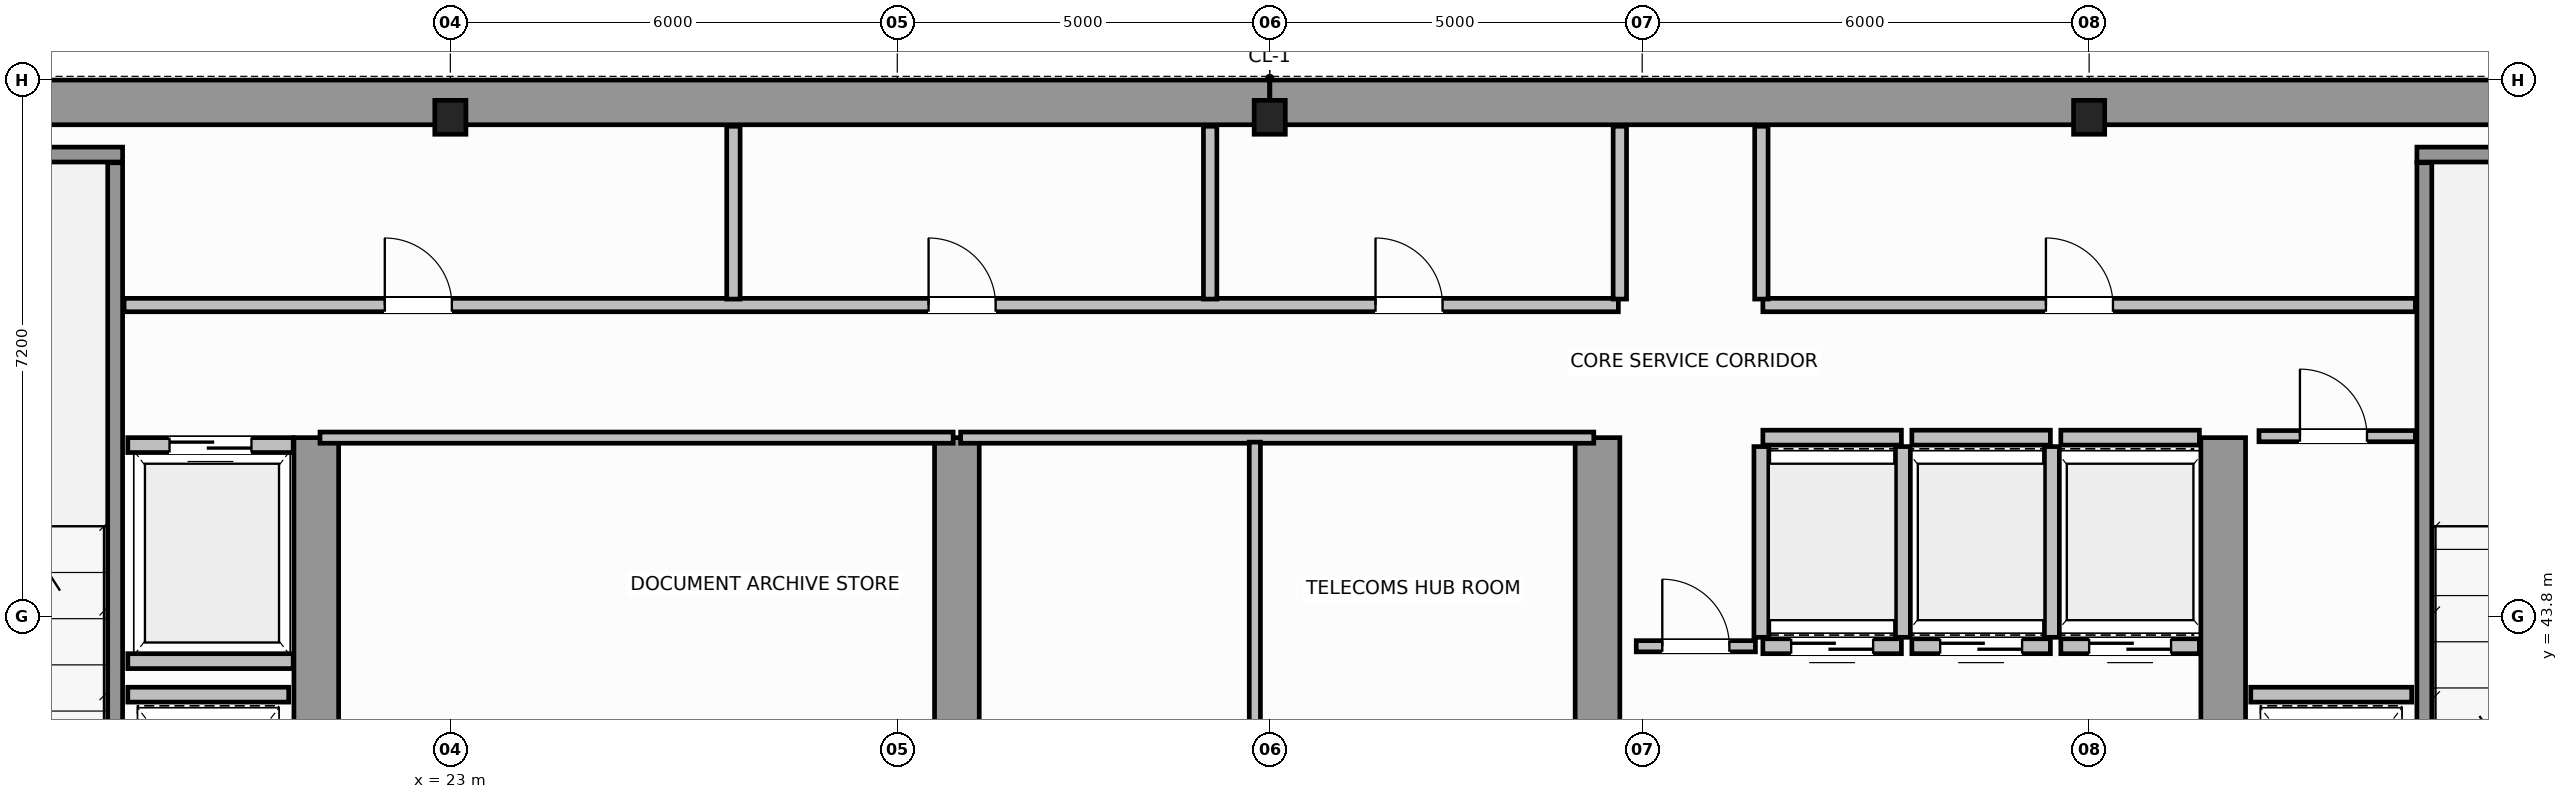
"""IFC4 building model, lengths in metres.
Left out: names, types, materials, properties, quantities, classifications, styles, units other than length and angle.
Written with IfcOpenShell. Run it as: python <this file> out.ifc"""

import sys

from ifc_helpers import new_model, si_unit, direction, frame, frame_2d, origin, origin_2d, place, context, subcontext, project, spatial, rectangle, i_section, extrude, source, transform, mapped, element, fill, save


model = new_model("IFC4")
c1 = context("Model", 3, precision=1e-05, world=origin(), true_north=direction((0.0, 1.0)))
c2 = subcontext(c1, "Body", "Model", "MODEL_VIEW")
j1 = project(units=[si_unit("LENGTHUNIT", "METRE"), si_unit("PLANEANGLEUNIT", "RADIAN")], contexts=[c1])
p1 = place(None, origin())
s1 = spatial("IfcSite", under=j1, at=p1, CompositionType="ELEMENT")
p2 = place(p1, origin())
s2 = spatial("IfcBuilding", under=s1, at=p2, CompositionType="ELEMENT")
p3 = place(p2, frame((0.0, 0.0, 210.8)))
s3 = spatial("IfcBuildingStorey", under=s2, at=p3, CompositionType="ELEMENT", Elevation=210.8)
m1 = source(origin(), c2, "Body", "SweptSolid", [
    extrude(i_section(OverallWidth=0.418, OverallDepth=0.455, WebThickness=0.042, FlangeThickness=0.058, FilletRadius=0.015, at=origin_2d()), origin(), (0.0, 0.0, 1.0), 3.8),
])
for number, where, z_axis, x_axis in (
    (1, (23.0, 50.5, 0.0), (0.0, 0.0, 1.0), (1.0, 0.0, 0.0)),
    (2, (34.0, 50.5, 0.0), (0.0, 0.0, 1.0), (1.0, 0.0, 0.0)),
    (3, (45.0, 50.5, 0.0), (0.0, 0.0, 1.0), (1.0, 0.0, 0.0)),
):
    element("IfcColumn", number, at=place(p3, frame(where, z_axis=z_axis, x_axis=x_axis)), inside=s3, PredefinedType="COLUMN", context=c2, shape_type="MappedRepresentation", body=[
        mapped(m1, transform((0.0, 0.0, 0.0), scale=1.0)),
    ])
for number, where, z_axis, x_axis in (
    (4, (14.304, 50.7, 0.0), (0.0, 0.0, 1.0), (1.0, 0.0, 0.0)),
    (5, (34.002, 50.7, 0.0), (0.0, 0.0, 1.0), (1.0, 0.0, 0.0)),
):
    element("IfcWall", number, at=place(p3, frame(where, z_axis=z_axis, x_axis=x_axis)), inside=s3, PredefinedType="SHEAR", context=c2, shape_type="SweptSolid", body=[
        extrude(rectangle(XDim=19.694, YDim=0.6, at=frame_2d((9.847, 0.0))), origin(), (0.0, 0.0, 1.0), 3.8),
    ])
for number, where, z_axis, x_axis in (
    (6, (21.2, 36.82, 0.0), (0.0, 0.0, 1.0), (0.0, 1.0, 0.0)),
    (7, (29.8, 36.82, 0.0), (0.0, 0.0, 1.0), (0.0, 1.0, 0.0)),
    (8, (38.4, 36.82, 0.0), (0.0, 0.0, 1.0), (0.0, 1.0, 0.0)),
    (9, (46.8, 36.82, 0.0), (0.0, 0.0, 1.0), (0.0, 1.0, 0.0)),
):
    element("IfcWall", number, at=place(p3, frame(where, z_axis=z_axis, x_axis=x_axis)), inside=s3, PredefinedType="SHEAR", context=c2, shape_type="SweptSolid", body=[
        extrude(rectangle(XDim=9.38, YDim=0.6, at=frame_2d((4.69, 0.0))), origin(), (0.0, 0.0, 1.0), 3.8),
    ])
p4 = place(p3, frame((14.3, 50.0, 0.0), z_axis=(0.0, 0.0, 1.0), x_axis=(1.0, 0.0, 0.0)))
e10 = element("IfcWall", 10, at=p4, inside=s3, PredefinedType="SOLIDWALL", context=c2, shape_type="SweptSolid", body=[
    extrude(rectangle(XDim=4.3, YDim=0.2, at=frame_2d((2.15, 0.0))), origin(), (0.0, 0.0, 1.0), 3.8),
])
p5 = place(p3, frame((18.5, 39.96, 0.0), z_axis=(0.0, 0.0, 1.0), x_axis=(0.0, 1.0, 0.0)))
e11 = element("IfcWall", 11, at=p5, inside=s3, PredefinedType="SOLIDWALL", context=c2, shape_type="SweptSolid", body=[
    extrude(rectangle(XDim=9.93, YDim=0.2, at=frame_2d((4.965, 0.0))), origin(), (0.0, 0.0, 1.0), 3.8),
])
p6 = place(p3, frame((49.4, 50.0, 0.0), z_axis=(0.0, 0.0, 1.0), x_axis=(1.0, 0.0, 0.0)))
e12 = element("IfcWall", 12, at=p6, inside=s3, PredefinedType="SOLIDWALL", context=c2, shape_type="SweptSolid", body=[
    extrude(rectangle(XDim=4.3, YDim=0.2, at=frame_2d((2.15, 0.0))), origin(), (0.0, 0.0, 1.0), 3.8),
])
p7 = place(p3, frame((49.5, 39.96, 0.0), z_axis=(0.0, 0.0, 1.0), x_axis=(0.0, 1.0, 0.0)))
e13 = element("IfcWall", 13, at=p7, inside=s3, PredefinedType="SOLIDWALL", context=c2, shape_type="SweptSolid", body=[
    extrude(rectangle(XDim=9.93, YDim=0.2, at=frame_2d((4.965, 0.0))), origin(), (0.0, 0.0, 1.0), 3.8),
])
p8 = place(p3, frame((40.62, 43.4, 0.0), z_axis=(0.0, 0.0, 1.0), x_axis=(1.0, 0.0, 0.0)))
e14 = element("IfcWall", 14, at=p8, inside=s3, PredefinedType="SOLIDWALL", context=c2, shape_type="SweptSolid", body=[
    extrude(rectangle(XDim=1.86, YDim=0.2, at=frame_2d((0.93, 0.0))), origin(), (0.0, 0.0, 1.0), 3.58),
])
p9 = place(p8, frame((0.38, 0.0, 0.0)))
e15 = element("IfcOpeningElement", 15, at=p9, cuts=e14, PredefinedType="OPENING", context=c2, shape_type="SweptSolid", body=[
    extrude(rectangle(XDim=1.1, YDim=2.15, at=frame_2d((0.55, 1.075))), frame((0.0, 0.11, 0.0), z_axis=(0.0, -1.0, 0.0), x_axis=(1.0, 0.0, 0.0)), (0.0, 0.0, 1.0), 0.22),
])
p10 = place(p3, frame((40.62, 46.2, 0.0), z_axis=(0.0, 0.0, 1.0), x_axis=(1.0, 0.0, 0.0)))
e16 = element("IfcWall", 16, at=p10, inside=s3, PredefinedType="SOLIDWALL", context=c2, shape_type="SweptSolid", body=[
    extrude(rectangle(XDim=1.86, YDim=0.2, at=frame_2d((0.93, 0.0))), origin(), (0.0, 0.0, 1.0), 3.58),
])
for number, where, z_axis, x_axis in (
    (17, (40.6, 43.52, 0.0), (0.0, 0.0, 1.0), (0.0, 1.0, 0.0)),
    (18, (42.5, 43.52, 0.0), (0.0, 0.0, 1.0), (0.0, 1.0, 0.0)),
):
    element("IfcWall", number, at=place(p3, frame(where, z_axis=z_axis, x_axis=x_axis)), inside=s3, PredefinedType="SOLIDWALL", context=c2, shape_type="SweptSolid", body=[
        extrude(rectangle(XDim=2.56, YDim=0.2, at=frame_2d((1.28, 0.0))), origin(), (0.0, 0.0, 1.0), 3.58),
    ])
p11 = place(p3, frame((42.62, 43.4, 0.0), z_axis=(0.0, 0.0, 1.0), x_axis=(1.0, 0.0, 0.0)))
e19 = element("IfcWall", 19, at=p11, inside=s3, PredefinedType="SOLIDWALL", context=c2, shape_type="SweptSolid", body=[
    extrude(rectangle(XDim=1.86, YDim=0.2, at=frame_2d((0.93, 0.0))), origin(), (0.0, 0.0, 1.0), 3.58),
])
p12 = place(p11, frame((0.38, 0.0, 0.0)))
e20 = element("IfcOpeningElement", 20, at=p12, cuts=e19, PredefinedType="OPENING", context=c2, shape_type="SweptSolid", body=[
    extrude(rectangle(XDim=1.1, YDim=2.15, at=frame_2d((0.55, 1.075))), frame((0.0, 0.11, 0.0), z_axis=(0.0, -1.0, 0.0), x_axis=(1.0, 0.0, 0.0)), (0.0, 0.0, 1.0), 0.22),
])
p13 = place(p3, frame((42.62, 46.2, 0.0), z_axis=(0.0, 0.0, 1.0), x_axis=(1.0, 0.0, 0.0)))
e21 = element("IfcWall", 21, at=p13, inside=s3, PredefinedType="SOLIDWALL", context=c2, shape_type="SweptSolid", body=[
    extrude(rectangle(XDim=1.86, YDim=0.2, at=frame_2d((0.93, 0.0))), origin(), (0.0, 0.0, 1.0), 3.58),
])
p14 = place(p3, frame((44.5, 43.52, 0.0), z_axis=(0.0, 0.0, 1.0), x_axis=(0.0, 1.0, 0.0)))
e22 = element("IfcWall", 22, at=p14, inside=s3, PredefinedType="SOLIDWALL", context=c2, shape_type="SweptSolid", body=[
    extrude(rectangle(XDim=2.56, YDim=0.2, at=frame_2d((1.28, 0.0))), origin(), (0.0, 0.0, 1.0), 3.58),
])
p15 = place(p3, frame((44.62, 43.4, 0.0), z_axis=(0.0, 0.0, 1.0), x_axis=(1.0, 0.0, 0.0)))
e23 = element("IfcWall", 23, at=p15, inside=s3, PredefinedType="SOLIDWALL", context=c2, shape_type="SweptSolid", body=[
    extrude(rectangle(XDim=1.86, YDim=0.2, at=frame_2d((0.93, 0.0))), origin(), (0.0, 0.0, 1.0), 3.58),
])
p16 = place(p15, frame((0.38, 0.0, 0.0)))
e24 = element("IfcOpeningElement", 24, at=p16, cuts=e23, PredefinedType="OPENING", context=c2, shape_type="SweptSolid", body=[
    extrude(rectangle(XDim=1.1, YDim=2.15, at=frame_2d((0.55, 1.075))), frame((0.0, 0.11, 0.0), z_axis=(0.0, -1.0, 0.0), x_axis=(1.0, 0.0, 0.0)), (0.0, 0.0, 1.0), 0.22),
])
p17 = place(p3, frame((44.62, 46.2, 0.0), z_axis=(0.0, 0.0, 1.0), x_axis=(1.0, 0.0, 0.0)))
e25 = element("IfcWall", 25, at=p17, inside=s3, PredefinedType="SOLIDWALL", context=c2, shape_type="SweptSolid", body=[
    extrude(rectangle(XDim=1.86, YDim=0.2, at=frame_2d((0.93, 0.0))), origin(), (0.0, 0.0, 1.0), 3.58),
])
p18 = place(p3, frame((18.67, 46.1, 0.0), z_axis=(0.0, 0.0, 1.0), x_axis=(1.0, 0.0, 0.0)))
e26 = element("IfcWall", 26, at=p18, inside=s3, PredefinedType="SOLIDWALL", context=c2, shape_type="SweptSolid", body=[
    extrude(rectangle(XDim=2.22, YDim=0.2, at=frame_2d((1.11, 0.0))), origin(), (0.0, 0.0, 1.0), 3.58),
])
p19 = place(p18, frame((0.56, 0.0, 0.0)))
e27 = element("IfcOpeningElement", 27, at=p19, cuts=e26, PredefinedType="OPENING", context=c2, shape_type="SweptSolid", body=[
    extrude(rectangle(XDim=1.1, YDim=2.15, at=frame_2d((0.55, 1.075))), frame((0.0, 0.11, 0.0), z_axis=(0.0, -1.0, 0.0), x_axis=(1.0, 0.0, 0.0)), (0.0, 0.0, 1.0), 0.22),
])
p20 = place(p3, frame((18.67, 43.2, 0.0), z_axis=(0.0, 0.0, 1.0), x_axis=(1.0, 0.0, 0.0)))
e28 = element("IfcWall", 28, at=p20, inside=s3, PredefinedType="SOLIDWALL", context=c2, shape_type="SweptSolid", body=[
    extrude(rectangle(XDim=2.22, YDim=0.2, at=frame_2d((1.11, 0.0))), origin(), (0.0, 0.0, 1.0), 3.58),
])
for number, where, z_axis, x_axis in (
    (29, (18.67, 42.75, 0.0), (0.0, 0.0, 1.0), (1.0, 0.0, 0.0)),
    (30, (47.17, 42.75, 0.0), (0.0, 0.0, 1.0), (1.0, 0.0, 0.0)),
):
    element("IfcWall", number, at=place(p3, frame(where, z_axis=z_axis, x_axis=x_axis)), inside=s3, PredefinedType="SOLIDWALL", context=c2, shape_type="SweptSolid", body=[
        extrude(rectangle(XDim=2.16, YDim=0.2, at=frame_2d((1.08, 0.0))), origin(), (0.0, 0.0, 1.0), 3.58),
    ])
for number, where, z_axis, x_axis in (
    (31, (21.25, 46.2, 0.0), (0.0, 0.0, 1.0), (1.0, 0.0, 0.0)),
    (32, (29.85, 46.2, 0.0), (0.0, 0.0, 1.0), (1.0, 0.0, 0.0)),
):
    element("IfcWall", number, at=place(p3, frame(where, z_axis=z_axis, x_axis=x_axis)), inside=s3, PredefinedType="PARTITIONING", context=c2, shape_type="SweptSolid", body=[
        extrude(rectangle(XDim=8.5, YDim=0.15, at=frame_2d((4.25, 0.0))), origin(), (0.0, 0.0, 1.0), 3.58),
    ])
p21 = place(p3, frame((33.8, 36.56, 0.0), z_axis=(0.0, 0.0, 1.0), x_axis=(0.0, 1.0, 0.0)))
e33 = element("IfcWall", 33, at=p21, inside=s3, PredefinedType="PARTITIONING", context=c2, shape_type="SweptSolid", body=[
    extrude(rectangle(XDim=9.58, YDim=0.15, at=frame_2d((4.79, 0.0))), origin(), (0.0, 0.0, 1.0), 3.58),
])
p22 = place(p21, frame((4.2, 0.0, 0.0)))
e34 = element("IfcOpeningElement", 34, at=p22, cuts=e33, PredefinedType="OPENING", context=c2, shape_type="SweptSolid", body=[
    extrude(rectangle(XDim=0.9, YDim=2.1, at=frame_2d((0.45, 1.05))), frame((0.0, 0.085, 0.0), z_axis=(0.0, -1.0, 0.0), x_axis=(1.0, 0.0, 0.0)), (0.0, 0.0, 1.0), 0.17),
])
p23 = place(p3, frame((47.28, 46.22, 0.0), z_axis=(0.0, 0.0, 1.0), x_axis=(1.0, 0.0, 0.0)))
e35 = element("IfcWall", 35, at=p23, inside=s3, PredefinedType="PARTITIONING", context=c2, shape_type="SweptSolid", body=[
    extrude(rectangle(XDim=2.1, YDim=0.15, at=frame_2d((1.05, 0.0))), origin(), (0.0, 0.0, 1.0), 3.58),
])
p24 = place(p23, frame((0.55, 0.0, 0.0)))
e36 = element("IfcOpeningElement", 36, at=p24, cuts=e35, PredefinedType="OPENING", context=c2, shape_type="SweptSolid", body=[
    extrude(rectangle(XDim=0.9, YDim=2.1, at=frame_2d((0.45, 1.05))), frame((0.0, 0.085, 0.0), z_axis=(0.0, -1.0, 0.0), x_axis=(1.0, 0.0, 0.0)), (0.0, 0.0, 1.0), 0.17),
])
p25 = place(p3, frame((38.92, 43.4, 0.0), z_axis=(0.0, 0.0, 1.0), x_axis=(1.0, 0.0, 0.0)))
e37 = element("IfcWall", 37, at=p25, inside=s3, PredefinedType="PARTITIONING", context=c2, shape_type="SweptSolid", body=[
    extrude(rectangle(XDim=1.6, YDim=0.15, at=frame_2d((0.8, 0.0))), origin(), (0.0, 0.0, 1.0), 3.58),
])
p26 = place(p25, frame((0.35, 0.0, 0.0)))
e38 = element("IfcOpeningElement", 38, at=p26, cuts=e37, PredefinedType="OPENING", context=c2, shape_type="SweptSolid", body=[
    extrude(rectangle(XDim=0.9, YDim=2.1, at=frame_2d((0.45, 1.05))), frame((0.0, 0.085, 0.0), z_axis=(0.0, -1.0, 0.0), x_axis=(1.0, 0.0, 0.0)), (0.0, 0.0, 1.0), 0.17),
])
p27 = place(p3, frame((18.62, 47.98, 0.0), z_axis=(0.0, 0.0, 1.0), x_axis=(1.0, 0.0, 0.0)))
e39 = element("IfcWall", 39, at=p27, inside=s3, PredefinedType="PLUMBINGWALL", context=c2, shape_type="SweptSolid", body=[
    extrude(rectangle(XDim=20.06, YDim=0.18, at=frame_2d((10.03, 0.0))), origin(), (0.0, 0.0, 1.0), 3.58),
])
p28 = place(p27, frame((3.5, 0.0, 0.0)))
e40 = element("IfcOpeningElement", 40, at=p28, cuts=e39, PredefinedType="OPENING", context=c2, shape_type="SweptSolid", body=[
    extrude(rectangle(XDim=0.9, YDim=2.15, at=frame_2d((0.45, 1.075))), frame((0.0, 0.1, 0.0), z_axis=(0.0, -1.0, 0.0), x_axis=(1.0, 0.0, 0.0)), (0.0, 0.0, 1.0), 0.2),
])
p29 = place(p27, frame((10.8, 0.0, 0.0)))
e41 = element("IfcOpeningElement", 41, at=p29, cuts=e39, PredefinedType="OPENING", context=c2, shape_type="SweptSolid", body=[
    extrude(rectangle(XDim=0.9, YDim=2.15, at=frame_2d((0.45, 1.075))), frame((0.0, 0.1, 0.0), z_axis=(0.0, -1.0, 0.0), x_axis=(1.0, 0.0, 0.0)), (0.0, 0.0, 1.0), 0.2),
])
p30 = place(p27, frame((16.8, 0.0, 0.0)))
e42 = element("IfcOpeningElement", 42, at=p30, cuts=e39, PredefinedType="OPENING", context=c2, shape_type="SweptSolid", body=[
    extrude(rectangle(XDim=0.9, YDim=2.15, at=frame_2d((0.45, 1.075))), frame((0.0, 0.1, 0.0), z_axis=(0.0, -1.0, 0.0), x_axis=(1.0, 0.0, 0.0)), (0.0, 0.0, 1.0), 0.2),
])
p31 = place(p3, frame((40.62, 47.98, 0.0), z_axis=(0.0, 0.0, 1.0), x_axis=(1.0, 0.0, 0.0)))
e43 = element("IfcWall", 43, at=p31, inside=s3, PredefinedType="PLUMBINGWALL", context=c2, shape_type="SweptSolid", body=[
    extrude(rectangle(XDim=8.76, YDim=0.18, at=frame_2d((4.38, 0.0))), origin(), (0.0, 0.0, 1.0), 3.58),
])
p32 = place(p31, frame((3.8, 0.0, 0.0)))
e44 = element("IfcOpeningElement", 44, at=p32, cuts=e43, PredefinedType="OPENING", context=c2, shape_type="SweptSolid", body=[
    extrude(rectangle(XDim=0.9, YDim=2.15, at=frame_2d((0.45, 1.075))), frame((0.0, 0.1, 0.0), z_axis=(0.0, -1.0, 0.0), x_axis=(1.0, 0.0, 0.0)), (0.0, 0.0, 1.0), 0.2),
])
for number, where, z_axis, x_axis in (
    (45, (26.8, 48.06, 0.0), (0.0, 0.0, 1.0), (0.0, 1.0, 0.0)),
    (46, (33.2, 48.06, 0.0), (0.0, 0.0, 1.0), (0.0, 1.0, 0.0)),
    (47, (38.7, 48.06, 0.0), (0.0, 0.0, 1.0), (0.0, 1.0, 0.0)),
    (48, (40.6, 48.06, 0.0), (0.0, 0.0, 1.0), (0.0, 1.0, 0.0)),
):
    element("IfcWall", number, at=place(p3, frame(where, z_axis=z_axis, x_axis=x_axis)), inside=s3, PredefinedType="PLUMBINGWALL", context=c2, shape_type="SweptSolid", body=[
        extrude(rectangle(XDim=2.32, YDim=0.18, at=frame_2d((1.16, 0.0))), origin(), (0.0, 0.0, 1.0), 3.58),
    ])
m2 = source(origin(), c2, "Body", "SweptSolid", [
    extrude(rectangle(XDim=1.1, YDim=2.15, at=frame_2d((0.55, 1.075))), frame((0.0, 0.025, 0.0), z_axis=(0.0, -1.0, 0.0), x_axis=(1.0, 0.0, 0.0)), (0.0, 0.0, 1.0), 0.05),
])
p33 = place(p9, origin())
e49 = element("IfcDoor", 49, at=p33, inside=s3, OperationType="DOUBLE_DOOR_SLIDING", PredefinedType="DOOR", context=c2, shape_type="MappedRepresentation", body=[
    mapped(m2, transform((0.0, 0.0, 0.0), scale=1.0)),
])
fill(e15, e49)
p34 = place(p12, origin())
e50 = element("IfcDoor", 50, at=p34, inside=s3, OperationType="DOUBLE_DOOR_SLIDING", PredefinedType="DOOR", context=c2, shape_type="MappedRepresentation", body=[
    mapped(m2, transform((0.0, 0.0, 0.0), scale=1.0)),
])
fill(e20, e50)
p35 = place(p16, origin())
e51 = element("IfcDoor", 51, at=p35, inside=s3, OperationType="DOUBLE_DOOR_SLIDING", PredefinedType="DOOR", context=c2, shape_type="MappedRepresentation", body=[
    mapped(m2, transform((0.0, 0.0, 0.0), scale=1.0)),
])
fill(e24, e51)
p36 = place(p19, origin())
e52 = element("IfcDoor", 52, at=p36, inside=s3, OperationType="DOUBLE_DOOR_SLIDING", PredefinedType="DOOR", context=c2, shape_type="MappedRepresentation", body=[
    mapped(m2, transform((0.0, 0.0, 0.0), scale=1.0)),
])
fill(e27, e52)
m3 = source(origin(), c2, "Body", "SweptSolid", [
    extrude(rectangle(XDim=0.9, YDim=2.1, at=frame_2d((0.45, 1.05))), frame((0.0, 0.025, 0.0), z_axis=(0.0, -1.0, 0.0), x_axis=(1.0, 0.0, 0.0)), (0.0, 0.0, 1.0), 0.05),
])
p37 = place(p24, origin())
e53 = element("IfcDoor", 53, at=p37, inside=s3, OperationType="SINGLE_SWING_RIGHT", PredefinedType="DOOR", context=c2, shape_type="MappedRepresentation", body=[
    mapped(m3, transform((0.0, 0.0, 0.0), scale=1.0)),
])
fill(e36, e53)
p38 = place(p26, origin())
e54 = element("IfcDoor", 54, at=p38, inside=s3, OperationType="SINGLE_SWING_LEFT", PredefinedType="DOOR", context=c2, shape_type="MappedRepresentation", body=[
    mapped(m3, transform((0.0, 0.0, 0.0), scale=1.0)),
])
fill(e38, e54)
m4 = source(origin(), c2, "Body", "SweptSolid", [
    extrude(rectangle(XDim=0.9, YDim=2.15, at=frame_2d((0.45, 1.075))), frame((0.0, 0.025, 0.0), z_axis=(0.0, -1.0, 0.0), x_axis=(1.0, 0.0, 0.0)), (0.0, 0.0, 1.0), 0.05),
])
p39 = place(p28, origin())
e55 = element("IfcDoor", 55, at=p39, inside=s3, OperationType="SINGLE_SWING_LEFT", PredefinedType="DOOR", context=c2, shape_type="MappedRepresentation", body=[
    mapped(m4, transform((0.0, 0.0, 0.0), scale=1.0)),
])
fill(e40, e55)
p40 = place(p29, origin())
e56 = element("IfcDoor", 56, at=p40, inside=s3, OperationType="SINGLE_SWING_RIGHT", PredefinedType="DOOR", context=c2, shape_type="MappedRepresentation", body=[
    mapped(m4, transform((0.0, 0.0, 0.0), scale=1.0)),
])
fill(e41, e56)
p41 = place(p30, origin())
e57 = element("IfcDoor", 57, at=p41, inside=s3, OperationType="SINGLE_SWING_LEFT", PredefinedType="DOOR", context=c2, shape_type="MappedRepresentation", body=[
    mapped(m4, transform((0.0, 0.0, 0.0), scale=1.0)),
])
fill(e42, e57)
p42 = place(p32, origin())
e58 = element("IfcDoor", 58, at=p42, inside=s3, OperationType="SINGLE_SWING_RIGHT", PredefinedType="DOOR", context=c2, shape_type="MappedRepresentation", body=[
    mapped(m4, transform((0.0, 0.0, 0.0), scale=1.0)),
])
fill(e44, e58)
save(model, sys.argv[1])
